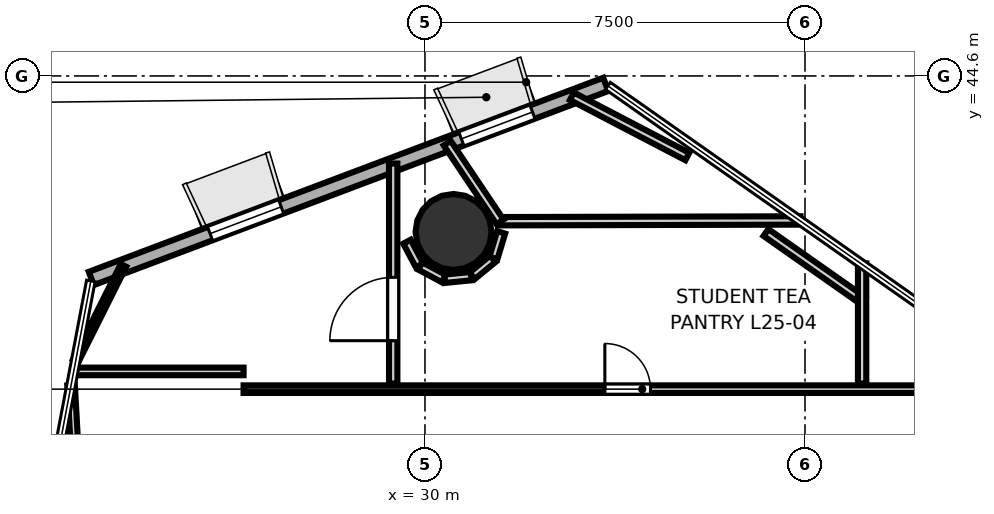
"""IFC4 building model, lengths in metres.
Left out: names, types, materials, properties, quantities, classifications, styles, units other than length and angle.
Written with IfcOpenShell. Run it as: python <this file> out.ifc"""

import sys

from ifc_helpers import new_model, si_unit, direction, frame, frame_2d, origin, origin_2d, place, context, subcontext, project, spatial, rectangle, hollow_circle, extrude, element, fill, save


model = new_model("IFC4")
c1 = context("Model", 3, precision=1e-05, world=origin(), true_north=direction((0.0, 1.0)))
c2 = subcontext(c1, "Body", "Model", "MODEL_VIEW")
j1 = project(units=[si_unit("LENGTHUNIT", "METRE"), si_unit("PLANEANGLEUNIT", "RADIAN")], contexts=[c1])
p1 = place(None, origin())
s1 = spatial("IfcSite", under=j1, at=p1, CompositionType="ELEMENT")
p2 = place(p1, origin())
s2 = spatial("IfcBuilding", under=s1, at=p2, CompositionType="ELEMENT")
p3 = place(p2, frame((0.0, 0.0, 101.5)))
s3 = spatial("IfcBuildingStorey", under=s2, at=p3, CompositionType="ELEMENT", Elevation=101.5)
p4 = place(p3, frame((30.564, 41.521, 0.0), z_axis=(0.0, 0.0, 1.0), x_axis=(1.0, 0.0, 0.0)))
e1 = element("IfcColumn", 1, at=p4, inside=s3, PredefinedType="COLUMN", context=c2, shape_type="SweptSolid", body=[
    extrude(hollow_circle(Radius=0.75, WallThickness=0.036, at=origin_2d()), origin(), (0.0, 0.0, 1.0), 3.7),
])
p5 = place(p3, frame((33.568, 44.433, 0.0), z_axis=(0.0, 0.0, 1.0), x_axis=(-0.935658075395, -0.352907871757, 0.0)))
e2 = element("IfcWall", 2, at=p5, inside=s3, PredefinedType="SOLIDWALL", context=c2, shape_type="SweptSolid", body=[
    extrude(rectangle(XDim=10.852, YDim=0.28, at=frame_2d((5.426, 0.0))), origin(), (0.0, 0.0, 1.0), 3.52),
])
p6 = place(p5, frame((1.545, 0.0, 0.85)))
e3 = element("IfcOpeningElement", 3, at=p6, cuts=e2, PredefinedType="OPENING", context=c2, shape_type="SweptSolid", body=[
    extrude(rectangle(XDim=1.5, YDim=2.1, at=frame_2d((0.75, 1.05))), frame((0.0, 0.15, 0.0), z_axis=(0.0, -1.0, 0.0), x_axis=(1.0, 0.0, 0.0)), (0.0, 0.0, 1.0), 0.3),
])
p7 = place(p5, frame((6.846, 0.0, 0.85)))
e4 = element("IfcOpeningElement", 4, at=p7, cuts=e2, PredefinedType="OPENING", context=c2, shape_type="SweptSolid", body=[
    extrude(rectangle(XDim=1.5, YDim=2.1, at=frame_2d((0.75, 1.05))), frame((0.0, 0.15, 0.0), z_axis=(0.0, -1.0, 0.0), x_axis=(1.0, 0.0, 0.0)), (0.0, 0.0, 1.0), 0.3),
])
p8 = place(p3, frame((26.42, 38.419, 0.0), z_axis=(0.0, 0.0, 1.0), x_axis=(1.0, 0.0, 0.0)))
e5 = element("IfcWall", 5, at=p8, inside=s3, PredefinedType="PARTITIONING", context=c2, shape_type="SweptSolid", body=[
    extrude(rectangle(XDim=15.734, YDim=0.15, at=frame_2d((7.867, 0.0))), origin(), (0.0, 0.0, 1.0), 2.84),
])
p9 = place(p8, frame((7.13, 0.0, 0.0)))
e6 = element("IfcOpeningElement", 6, at=p9, cuts=e5, PredefinedType="OPENING", context=c2, shape_type="SweptSolid", body=[
    extrude(rectangle(XDim=0.9, YDim=2.1, at=frame_2d((0.45, 1.05))), frame((0.0, 0.085, 0.0), z_axis=(0.0, -1.0, 0.0), x_axis=(1.0, 0.0, 0.0)), (0.0, 0.0, 1.0), 0.17),
])
p10 = place(p3, frame((23.581, 28.307, 0.0), z_axis=(0.0, 0.0, 1.0), x_axis=(-0.055409067337, 0.998463737577, 0.0)))
e7 = element("IfcWall", 7, at=p10, inside=s3, PredefinedType="PARTITIONING", context=c2, shape_type="SweptSolid", body=[
    extrude(rectangle(XDim=10.205, YDim=0.15, at=frame_2d((5.102, 0.0))), origin(), (0.0, 0.0, 1.0), 2.84),
])
p11 = place(p3, frame((23.047, 38.769, 0.0), z_axis=(0.0, 0.0, 1.0), x_axis=(1.0, 0.0, 0.0)))
e8 = element("IfcWall", 8, at=p11, inside=s3, PredefinedType="PARTITIONING", context=c2, shape_type="SweptSolid", body=[
    extrude(rectangle(XDim=3.373, YDim=0.15, at=frame_2d((1.686, 0.0))), origin(), (0.0, 0.0, 1.0), 2.84),
])
p12 = place(p3, frame((29.373, 38.53, 0.0), z_axis=(0.0, 0.0, 1.0), x_axis=(0.0, 1.0, 0.0)))
e9 = element("IfcWall", 9, at=p12, inside=s3, PredefinedType="PLUMBINGWALL", context=c2, shape_type="SweptSolid", body=[
    extrude(rectangle(XDim=4.341, YDim=0.165, at=frame_2d((2.17, 0.0))), origin(), (0.0, 0.0, 1.0), 2.84),
])
p13 = place(p12, frame((0.845, 0.0, 0.0)))
e10 = element("IfcOpeningElement", 10, at=p13, cuts=e9, PredefinedType="OPENING", context=c2, shape_type="SweptSolid", body=[
    extrude(rectangle(XDim=1.25, YDim=2.2, at=frame_2d((0.625, 1.1))), frame((0.0, 0.093, 0.0), z_axis=(0.0, -1.0, 0.0), x_axis=(1.0, 0.0, 0.0)), (0.0, 0.0, 1.0), 0.185),
])
p14 = place(p3, frame((32.899, 44.198, 0.0), z_axis=(0.0, 0.0, 1.0), x_axis=(0.886559432929, -0.462614712135, 0.0)))
e11 = element("IfcWall", 11, at=p14, inside=s3, PredefinedType="PLUMBINGWALL", context=c2, shape_type="SweptSolid", body=[
    extrude(rectangle(XDim=2.57, YDim=0.165, at=frame_2d((1.285, 0.0))), origin(), (0.0, 0.0, 1.0), 2.84),
])
p15 = place(p3, frame((37.412, 41.748, 0.0), z_axis=(0.0, 0.0, 1.0), x_axis=(-0.999996875015, -0.002499992188, 0.0)))
e12 = element("IfcWall", 12, at=p15, inside=s3, PredefinedType="PLUMBINGWALL", context=c2, shape_type="SweptSolid", body=[
    extrude(rectangle(XDim=5.957, YDim=0.165, at=frame_2d((2.979, 0.0))), origin(), (0.0, 0.0, 1.0), 2.84),
])
p16 = place(p3, frame((31.481, 41.719, 0.0), z_axis=(0.0, 0.0, 1.0), x_axis=(-0.55689586122, 0.830582325694, 0.0)))
e13 = element("IfcWall", 13, at=p16, inside=s3, PredefinedType="PLUMBINGWALL", context=c2, shape_type="SweptSolid", body=[
    extrude(rectangle(XDim=1.872, YDim=0.165, at=frame_2d((0.936, 0.0))), origin(), (0.0, 0.0, 1.0), 2.84),
])
p17 = place(p3, frame((29.644, 41.329, 0.0), z_axis=(0.0, 0.0, 1.0), x_axis=(0.471618839574, -0.881802511994, 0.0)))
e14 = element("IfcWall", 14, at=p17, inside=s3, PredefinedType="PLUMBINGWALL", context=c2, shape_type="SweptSolid", body=[
    extrude(rectangle(XDim=0.529, YDim=0.165, at=frame_2d((0.264, 0.0))), origin(), (0.0, 0.0, 1.0), 2.84),
])
for number, where, z_axis, x_axis in (
    (15, (29.906, 40.85, 0.0), (0.0, 0.0, 1.0), (0.882, -0.471, 0.0)),
    (16, (30.389, 40.598, 0.0), (0.0, 0.0, 1.0), (0.995, 0.098, 0.0)),
    (17, (30.932, 40.656, 0.0), (0.0, 0.0, 1.0), (0.773, 0.634, 0.0)),
):
    element("IfcWall", number, at=place(p3, frame(where, z_axis=z_axis, x_axis=x_axis)), inside=s3, PredefinedType="PLUMBINGWALL", context=c2, shape_type="SweptSolid", body=[
        extrude(rectangle(XDim=0.528, YDim=0.165, at=frame_2d((0.264, 0.0))), origin(), (0.0, 0.0, 1.0), 2.84),
    ])
p18 = place(p3, frame((31.35, 41.007, 0.0), z_axis=(0.0, 0.0, 1.0), x_axis=(0.289674521973, 0.957125211934, 0.0)))
e18 = element("IfcWall", 18, at=p18, inside=s3, PredefinedType="PLUMBINGWALL", context=c2, shape_type="SweptSolid", body=[
    extrude(rectangle(XDim=0.529, YDim=0.165, at=frame_2d((0.265, 0.0))), origin(), (0.0, 0.0, 1.0), 2.84),
])
p19 = place(p3, frame((36.729, 41.51, 0.0), z_axis=(0.0, 0.0, 1.0), x_axis=(0.818376410008, -0.574682565894, 0.0)))
e19 = element("IfcWall", 19, at=p19, inside=s3, PredefinedType="PLUMBINGWALL", context=c2, shape_type="SweptSolid", body=[
    extrude(rectangle(XDim=2.335, YDim=0.165, at=frame_2d((1.167, 0.0))), origin(), (0.0, 0.0, 1.0), 2.84),
])
p20 = place(p3, frame((38.627, 40.901, 0.0), z_axis=(0.0, 0.0, 1.0), x_axis=(0.0, -1.0, 0.0)))
e20 = element("IfcWall", 20, at=p20, inside=s3, PredefinedType="PLUMBINGWALL", context=c2, shape_type="SweptSolid", body=[
    extrude(rectangle(XDim=2.371, YDim=0.165, at=frame_2d((1.186, 0.0))), origin(), (0.0, 0.0, 1.0), 2.84),
])
p21 = place(p3, frame((23.107, 38.981, 0.0), z_axis=(0.0, 0.0, 1.0), x_axis=(0.448049356474, 0.894008822195, 0.0)))
e21 = element("IfcWall", 21, at=p21, inside=s3, PredefinedType="PARTITIONING", context=c2, shape_type="SweptSolid", body=[
    extrude(rectangle(XDim=2.103, YDim=0.12, at=frame_2d((1.051, 0.0))), origin(), (0.0, 0.0, 1.0), 2.84),
])
p22 = place(p9, origin())
e22 = element("IfcDoor", 22, at=p22, inside=s3, OperationType="SINGLE_SWING_LEFT", PredefinedType="DOOR", context=c2, shape_type="SweptSolid", body=[
    extrude(rectangle(XDim=0.9, YDim=2.1, at=frame_2d((0.45, 1.05))), frame((0.0, 0.025, 0.0), z_axis=(0.0, -1.0, 0.0), x_axis=(1.0, 0.0, 0.0)), (0.0, 0.0, 1.0), 0.05),
])
fill(e6, e22)
p23 = place(p13, origin())
e23 = element("IfcDoor", 23, at=p23, inside=s3, OperationType="SINGLE_SWING_LEFT", PredefinedType="DOOR", context=c2, shape_type="SweptSolid", body=[
    extrude(rectangle(XDim=1.25, YDim=2.2, at=frame_2d((0.625, 1.1))), frame((0.0, 0.025, 0.0), z_axis=(0.0, -1.0, 0.0), x_axis=(1.0, 0.0, 0.0)), (0.0, 0.0, 1.0), 0.05),
])
fill(e10, e23)
p24 = place(p6, origin())
e24 = element("IfcWindow", 24, at=p24, inside=s3, PartitioningType="SINGLE_PANEL", PredefinedType="WINDOW", context=c2, shape_type="SweptSolid", body=[
    extrude(rectangle(XDim=1.5, YDim=2.1, at=frame_2d((0.75, 1.05))), frame((0.0, 0.03, 0.0), z_axis=(0.0, -1.0, 0.0), x_axis=(1.0, 0.0, 0.0)), (0.0, 0.0, 1.0), 0.06),
])
fill(e3, e24)
p25 = place(p7, origin())
e25 = element("IfcWindow", 25, at=p25, inside=s3, PartitioningType="SINGLE_PANEL", PredefinedType="WINDOW", context=c2, shape_type="SweptSolid", body=[
    extrude(rectangle(XDim=1.5, YDim=2.1, at=frame_2d((0.75, 1.05))), frame((0.0, 0.03, 0.0), z_axis=(0.0, -1.0, 0.0), x_axis=(1.0, 0.0, 0.0)), (0.0, 0.0, 1.0), 0.06),
])
fill(e4, e25)
save(model, sys.argv[1])
